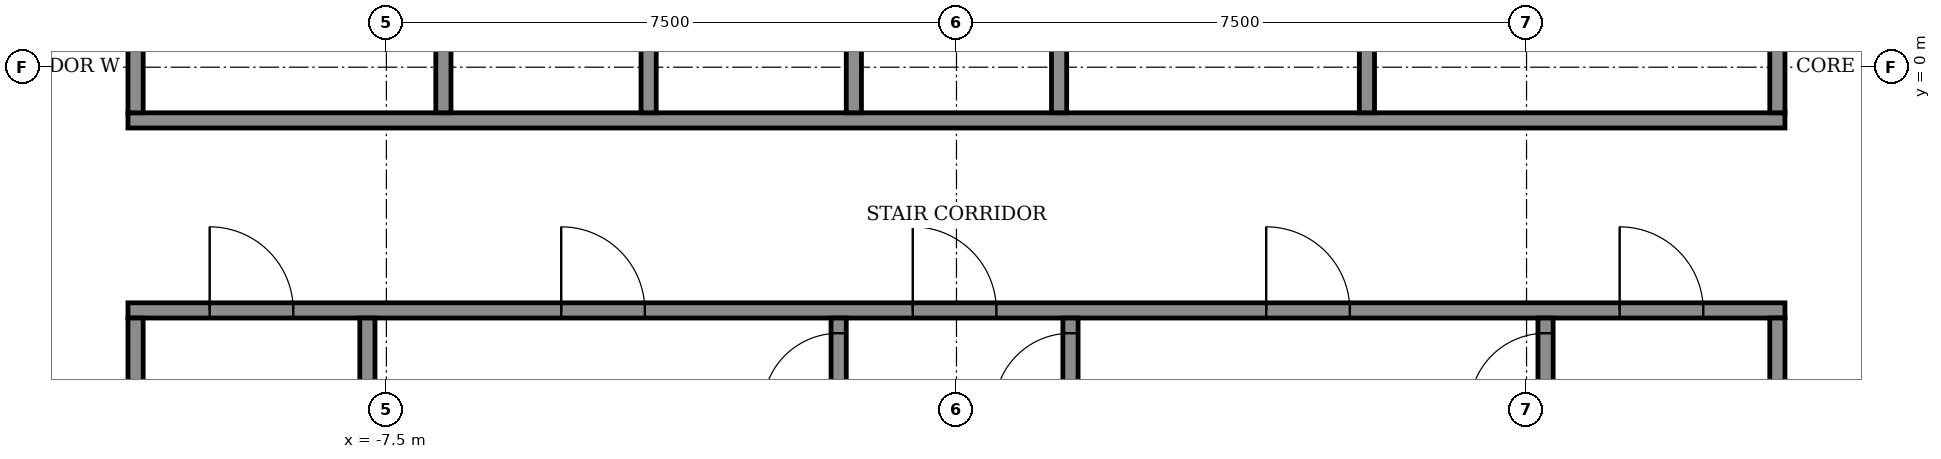
"""IFC4 building model, lengths in metres.
Left out: names, types, materials, properties, quantities, classifications, styles, units other than length and angle.
Written with IfcOpenShell. Run it as: python <this file> out.ifc"""

import sys

from ifc_helpers import new_model, si_unit, direction, frame, frame_2d, origin, place, context, subcontext, project, spatial, rectangle, extrude, element, fill, save


model = new_model("IFC4")
c1 = context("Model", 3, precision=1e-05, world=origin(), true_north=direction((0.0, 1.0)))
c2 = subcontext(c1, "Body", "Model", "MODEL_VIEW")
j1 = project(units=[si_unit("LENGTHUNIT", "METRE"), si_unit("PLANEANGLEUNIT", "RADIAN")], contexts=[c1])
p1 = place(None, origin())
s1 = spatial("IfcSite", under=j1, at=p1, CompositionType="ELEMENT")
p2 = place(p1, origin())
s2 = spatial("IfcBuilding", under=s1, at=p2, CompositionType="ELEMENT")
p3 = place(p2, frame((0.0, 0.0, 346.1)))
s3 = spatial("IfcBuildingStorey", under=s2, at=p3, CompositionType="ELEMENT", Elevation=346.1)
p4 = place(p3, frame((-10.9, -3.2, 0.0), z_axis=(0.0, 0.0, 1.0), x_axis=(1.0, 0.0, 0.0)))
e1 = element("IfcWall", 1, at=p4, inside=s3, PredefinedType="SHEAR", context=c2, shape_type="SweptSolid", body=[
    extrude(rectangle(XDim=21.8, YDim=0.2, at=frame_2d((10.9, 0.0))), origin(), (0.0, 0.0, 1.0), 4.05),
])
p5 = place(p4, frame((1.075, 0.0, 0.0)))
e2 = element("IfcOpeningElement", 2, at=p5, cuts=e1, PredefinedType="OPENING", context=c2, shape_type="SweptSolid", body=[
    extrude(rectangle(XDim=1.1, YDim=2.1, at=frame_2d((0.55, 1.05))), frame((0.0, 0.11, 0.0), z_axis=(0.0, -1.0, 0.0), x_axis=(1.0, 0.0, 0.0)), (0.0, 0.0, 1.0), 0.22),
])
p6 = place(p4, frame((10.325, 0.0, 0.0)))
e3 = element("IfcOpeningElement", 3, at=p6, cuts=e1, PredefinedType="OPENING", context=c2, shape_type="SweptSolid", body=[
    extrude(rectangle(XDim=1.1, YDim=2.1, at=frame_2d((0.55, 1.05))), frame((0.0, 0.11, 0.0), z_axis=(0.0, -1.0, 0.0), x_axis=(1.0, 0.0, 0.0)), (0.0, 0.0, 1.0), 0.22),
])
p7 = place(p4, frame((19.625, 0.0, 0.0)))
e4 = element("IfcOpeningElement", 4, at=p7, cuts=e1, PredefinedType="OPENING", context=c2, shape_type="SweptSolid", body=[
    extrude(rectangle(XDim=1.1, YDim=2.1, at=frame_2d((0.55, 1.05))), frame((0.0, 0.11, 0.0), z_axis=(0.0, -1.0, 0.0), x_axis=(1.0, 0.0, 0.0)), (0.0, 0.0, 1.0), 0.22),
])
p8 = place(p4, frame((5.7, 0.0, 0.0)))
e5 = element("IfcOpeningElement", 5, at=p8, cuts=e1, PredefinedType="OPENING", context=c2, shape_type="SweptSolid", body=[
    extrude(rectangle(XDim=1.1, YDim=2.1, at=frame_2d((0.55, 1.05))), frame((0.0, 0.11, 0.0), z_axis=(0.0, -1.0, 0.0), x_axis=(1.0, 0.0, 0.0)), (0.0, 0.0, 1.0), 0.22),
])
p9 = place(p4, frame((14.975, 0.0, 0.0)))
e6 = element("IfcOpeningElement", 6, at=p9, cuts=e1, PredefinedType="OPENING", context=c2, shape_type="SweptSolid", body=[
    extrude(rectangle(XDim=1.1, YDim=2.1, at=frame_2d((0.55, 1.05))), frame((0.0, 0.11, 0.0), z_axis=(0.0, -1.0, 0.0), x_axis=(1.0, 0.0, 0.0)), (0.0, 0.0, 1.0), 0.22),
])
p10 = place(p3, frame((-10.9, -0.7, 0.0), z_axis=(0.0, 0.0, 1.0), x_axis=(1.0, 0.0, 0.0)))
e7 = element("IfcWall", 7, at=p10, inside=s3, PredefinedType="SHEAR", context=c2, shape_type="SweptSolid", body=[
    extrude(rectangle(XDim=21.8, YDim=0.2, at=frame_2d((10.9, 0.0))), origin(), (0.0, 0.0, 1.0), 4.05),
])
for number, where, z_axis, x_axis in (
    (8, (-10.8, -10.8, 0.0), (0.0, 0.0, 1.0), (0.0, 1.0, 0.0)),
    (9, (-7.75, -10.8, 0.0), (0.0, 0.0, 1.0), (0.0, 1.0, 0.0)),
):
    element("IfcWall", number, at=place(p3, frame(where, z_axis=z_axis, x_axis=x_axis)), inside=s3, PredefinedType="SHEAR", context=c2, shape_type="SweptSolid", body=[
        extrude(rectangle(XDim=7.5, YDim=0.2, at=frame_2d((3.75, 0.0))), origin(), (0.0, 0.0, 1.0), 4.05),
    ])
p11 = place(p3, frame((-1.55, -10.8, 0.0), z_axis=(0.0, 0.0, 1.0), x_axis=(0.0, 1.0, 0.0)))
e10 = element("IfcWall", 10, at=p11, inside=s3, PredefinedType="SHEAR", context=c2, shape_type="SweptSolid", body=[
    extrude(rectangle(XDim=7.5, YDim=0.2, at=frame_2d((3.75, 0.0))), origin(), (0.0, 0.0, 1.0), 4.05),
])
p12 = place(p11, frame((6.3, 0.0, 0.0)))
e11 = element("IfcOpeningElement", 11, at=p12, cuts=e10, PredefinedType="OPENING", context=c2, shape_type="SweptSolid", body=[
    extrude(rectangle(XDim=1.0, YDim=2.1, at=frame_2d((0.5, 1.05))), frame((0.0, 0.11, 0.0), z_axis=(0.0, -1.0, 0.0), x_axis=(1.0, 0.0, 0.0)), (0.0, 0.0, 1.0), 0.22),
])
p13 = place(p3, frame((1.5, -10.8, 0.0), z_axis=(0.0, 0.0, 1.0), x_axis=(0.0, 1.0, 0.0)))
e12 = element("IfcWall", 12, at=p13, inside=s3, PredefinedType="SHEAR", context=c2, shape_type="SweptSolid", body=[
    extrude(rectangle(XDim=7.5, YDim=0.2, at=frame_2d((3.75, 0.0))), origin(), (0.0, 0.0, 1.0), 4.05),
])
p14 = place(p13, frame((6.3, 0.0, 0.0)))
e13 = element("IfcOpeningElement", 13, at=p14, cuts=e12, PredefinedType="OPENING", context=c2, shape_type="SweptSolid", body=[
    extrude(rectangle(XDim=1.0, YDim=2.1, at=frame_2d((0.5, 1.05))), frame((0.0, 0.11, 0.0), z_axis=(0.0, -1.0, 0.0), x_axis=(1.0, 0.0, 0.0)), (0.0, 0.0, 1.0), 0.22),
])
p15 = place(p3, frame((7.75, -10.8, 0.0), z_axis=(0.0, 0.0, 1.0), x_axis=(0.0, 1.0, 0.0)))
e14 = element("IfcWall", 14, at=p15, inside=s3, PredefinedType="SHEAR", context=c2, shape_type="SweptSolid", body=[
    extrude(rectangle(XDim=7.5, YDim=0.2, at=frame_2d((3.75, 0.0))), origin(), (0.0, 0.0, 1.0), 4.05),
])
p16 = place(p15, frame((6.3, 0.0, 0.0)))
e15 = element("IfcOpeningElement", 15, at=p16, cuts=e14, PredefinedType="OPENING", context=c2, shape_type="SweptSolid", body=[
    extrude(rectangle(XDim=1.0, YDim=2.1, at=frame_2d((0.5, 1.05))), frame((0.0, 0.11, 0.0), z_axis=(0.0, -1.0, 0.0), x_axis=(1.0, 0.0, 0.0)), (0.0, 0.0, 1.0), 0.22),
])
p17 = place(p3, frame((10.8, -10.8, 0.0), z_axis=(0.0, 0.0, 1.0), x_axis=(0.0, 1.0, 0.0)))
e16 = element("IfcWall", 16, at=p17, inside=s3, PredefinedType="SHEAR", context=c2, shape_type="SweptSolid", body=[
    extrude(rectangle(XDim=7.5, YDim=0.2, at=frame_2d((3.75, 0.0))), origin(), (0.0, 0.0, 1.0), 4.05),
])
p18 = place(p3, frame((-10.8, -0.6, 0.0), z_axis=(0.0, 0.0, 1.0), x_axis=(0.0, 1.0, 0.0)))
e17 = element("IfcWall", 17, at=p18, inside=s3, PredefinedType="STANDARD", context=c2, shape_type="SweptSolid", body=[
    extrude(rectangle(XDim=2.5, YDim=0.2, at=frame_2d((1.25, 0.0))), origin(), (0.0, 0.0, 1.0), 4.05),
])
for number, where, z_axis, x_axis in (
    (18, (-6.75, -0.6, 0.0), (0.0, 0.0, 1.0), (0.0, 1.0, 0.0)),
    (19, (-4.05, -0.6, 0.0), (0.0, 0.0, 1.0), (0.0, 1.0, 0.0)),
    (20, (-1.35, -0.6, 0.0), (0.0, 0.0, 1.0), (0.0, 1.0, 0.0)),
    (21, (1.35, -0.6, 0.0), (0.0, 0.0, 1.0), (0.0, 1.0, 0.0)),
):
    element("IfcWall", number, at=place(p3, frame(where, z_axis=z_axis, x_axis=x_axis)), inside=s3, PredefinedType="SHEAR", context=c2, shape_type="SweptSolid", body=[
        extrude(rectangle(XDim=2.5, YDim=0.2, at=frame_2d((1.25, 0.0))), origin(), (0.0, 0.0, 1.0), 4.05),
    ])
for number, where, z_axis, x_axis in (
    (22, (5.4, -0.6, 0.0), (0.0, 0.0, 1.0), (0.0, 1.0, 0.0)),
    (23, (10.8, -0.6, 0.0), (0.0, 0.0, 1.0), (0.0, 1.0, 0.0)),
):
    element("IfcWall", number, at=place(p3, frame(where, z_axis=z_axis, x_axis=x_axis)), inside=s3, PredefinedType="STANDARD", context=c2, shape_type="SweptSolid", body=[
        extrude(rectangle(XDim=2.5, YDim=0.2, at=frame_2d((1.25, 0.0))), origin(), (0.0, 0.0, 1.0), 4.05),
    ])
p19 = place(p5, origin())
e24 = element("IfcDoor", 24, at=p19, inside=s3, OperationType="SINGLE_SWING_RIGHT", PredefinedType="DOOR", context=c2, shape_type="SweptSolid", body=[
    extrude(rectangle(XDim=1.1, YDim=2.1, at=frame_2d((0.55, 1.05))), frame((0.0, 0.025, 0.0), z_axis=(0.0, -1.0, 0.0), x_axis=(1.0, 0.0, 0.0)), (0.0, 0.0, 1.0), 0.05),
])
fill(e2, e24)
p20 = place(p6, origin())
e25 = element("IfcDoor", 25, at=p20, inside=s3, OperationType="SINGLE_SWING_RIGHT", PredefinedType="DOOR", context=c2, shape_type="SweptSolid", body=[
    extrude(rectangle(XDim=1.1, YDim=2.1, at=frame_2d((0.55, 1.05))), frame((0.0, 0.025, 0.0), z_axis=(0.0, -1.0, 0.0), x_axis=(1.0, 0.0, 0.0)), (0.0, 0.0, 1.0), 0.05),
])
fill(e3, e25)
p21 = place(p7, origin())
e26 = element("IfcDoor", 26, at=p21, inside=s3, OperationType="SINGLE_SWING_RIGHT", PredefinedType="DOOR", context=c2, shape_type="SweptSolid", body=[
    extrude(rectangle(XDim=1.1, YDim=2.1, at=frame_2d((0.55, 1.05))), frame((0.0, 0.025, 0.0), z_axis=(0.0, -1.0, 0.0), x_axis=(1.0, 0.0, 0.0)), (0.0, 0.0, 1.0), 0.05),
])
fill(e4, e26)
p22 = place(p8, origin())
e27 = element("IfcDoor", 27, at=p22, inside=s3, OperationType="SINGLE_SWING_LEFT", PredefinedType="DOOR", context=c2, shape_type="SweptSolid", body=[
    extrude(rectangle(XDim=1.1, YDim=2.1, at=frame_2d((0.55, 1.05))), frame((0.0, 0.025, 0.0), z_axis=(0.0, -1.0, 0.0), x_axis=(1.0, 0.0, 0.0)), (0.0, 0.0, 1.0), 0.05),
])
fill(e5, e27)
p23 = place(p9, origin())
e28 = element("IfcDoor", 28, at=p23, inside=s3, OperationType="SINGLE_SWING_LEFT", PredefinedType="DOOR", context=c2, shape_type="SweptSolid", body=[
    extrude(rectangle(XDim=1.1, YDim=2.1, at=frame_2d((0.55, 1.05))), frame((0.0, 0.025, 0.0), z_axis=(0.0, -1.0, 0.0), x_axis=(1.0, 0.0, 0.0)), (0.0, 0.0, 1.0), 0.05),
])
fill(e6, e28)
p24 = place(p12, origin())
e29 = element("IfcDoor", 29, at=p24, inside=s3, OperationType="SINGLE_SWING_RIGHT", PredefinedType="DOOR", context=c2, shape_type="SweptSolid", body=[
    extrude(rectangle(XDim=1.0, YDim=2.1, at=frame_2d((0.5, 1.05))), frame((0.0, 0.025, 0.0), z_axis=(0.0, -1.0, 0.0), x_axis=(1.0, 0.0, 0.0)), (0.0, 0.0, 1.0), 0.05),
])
fill(e11, e29)
p25 = place(p14, origin())
e30 = element("IfcDoor", 30, at=p25, inside=s3, OperationType="SINGLE_SWING_RIGHT", PredefinedType="DOOR", context=c2, shape_type="SweptSolid", body=[
    extrude(rectangle(XDim=1.0, YDim=2.1, at=frame_2d((0.5, 1.05))), frame((0.0, 0.025, 0.0), z_axis=(0.0, -1.0, 0.0), x_axis=(1.0, 0.0, 0.0)), (0.0, 0.0, 1.0), 0.05),
])
fill(e13, e30)
p26 = place(p16, origin())
e31 = element("IfcDoor", 31, at=p26, inside=s3, OperationType="SINGLE_SWING_RIGHT", PredefinedType="DOOR", context=c2, shape_type="SweptSolid", body=[
    extrude(rectangle(XDim=1.0, YDim=2.1, at=frame_2d((0.5, 1.05))), frame((0.0, 0.025, 0.0), z_axis=(0.0, -1.0, 0.0), x_axis=(1.0, 0.0, 0.0)), (0.0, 0.0, 1.0), 0.05),
])
fill(e15, e31)
save(model, sys.argv[1])
